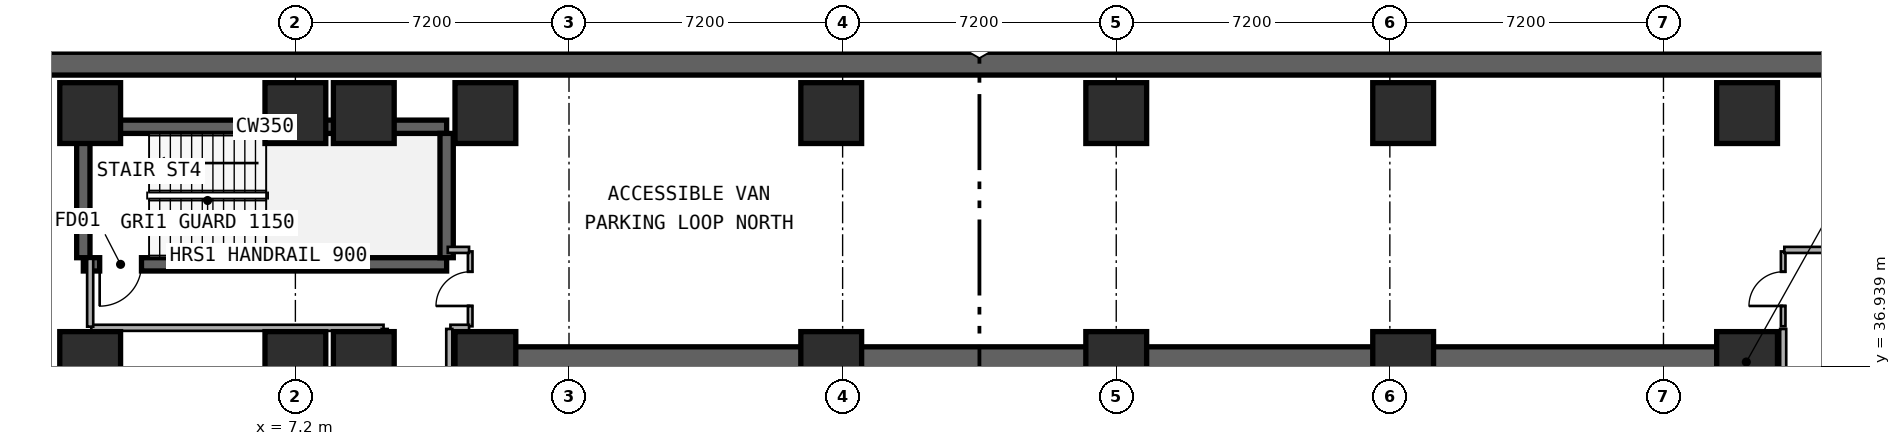
"""IFC4 building model, lengths in metres.
Left out: names, types, materials, properties, quantities, classifications, styles, units other than length and angle.
Written with IfcOpenShell. Run it as: python <this file> out.ifc"""

import sys

from ifc_helpers import new_model, si_unit, direction, frame, frame_2d, origin, origin_2d, place, context, subcontext, project, spatial, rectangle, extrude, element, fill, save


model = new_model("IFC4")
c1 = context("Model", 3, precision=1e-05, world=origin(), true_north=direction((0.0, 1.0)))
c2 = subcontext(c1, "Body", "Model", "MODEL_VIEW")
j1 = project(units=[si_unit("LENGTHUNIT", "METRE"), si_unit("PLANEANGLEUNIT", "RADIAN")], contexts=[c1])
p1 = place(None, origin())
s1 = spatial("IfcSite", under=j1, at=p1, CompositionType="ELEMENT")
p2 = place(p1, origin())
s2 = spatial("IfcBuilding", under=s1, at=p2, CompositionType="ELEMENT")
p3 = place(p2, frame((0.0, 0.0, -13.2)))
s3 = spatial("IfcBuildingStorey", under=s2, at=p3, CompositionType="ELEMENT", Elevation=-13.2)
p4 = place(p3, frame((0.3, 44.9, 0.0), z_axis=(0.0, 0.0, 1.0), x_axis=(1.0, 0.0, 0.0)))
e1 = element("IfcWall", 1, at=p4, inside=s3, PredefinedType="USERDEFINED", context=c2, shape_type="SweptSolid", body=[
    extrude(rectangle(XDim=57.0, YDim=0.6, at=frame_2d((28.5, 0.0))), origin(), (0.0, 0.0, 1.0), 4.4),
])
p5 = place(p3, frame((12.15, 37.05, 0.0), z_axis=(0.0, 0.0, 1.0), x_axis=(1.0, 0.0, 0.0)))
e2 = element("IfcWall", 2, at=p5, inside=s3, PredefinedType="SHEAR", context=c2, shape_type="SweptSolid", body=[
    extrude(rectangle(XDim=33.23, YDim=0.8, at=frame_2d((16.615, 0.0))), origin(), (0.0, 0.0, 1.0), 4.4),
])
p6 = place(p3, frame((1.62, 43.24, 0.0), z_axis=(0.0, 0.0, 1.0), x_axis=(1.0, 0.0, 0.0)))
e3 = element("IfcWall", 3, at=p6, inside=s3, PredefinedType="SHEAR", context=c2, shape_type="SweptSolid", body=[
    extrude(rectangle(XDim=9.56, YDim=0.35, at=frame_2d((4.78, 0.0))), origin(), (0.0, 0.0, 1.0), 4.4),
])
p7 = place(p3, frame((11.18, 39.62, 0.0), z_axis=(0.0, 0.0, 1.0), x_axis=(-1.0, 0.0, 0.0)))
e4 = element("IfcWall", 4, at=p7, inside=s3, PredefinedType="SHEAR", context=c2, shape_type="SweptSolid", body=[
    extrude(rectangle(XDim=9.56, YDim=0.35, at=frame_2d((4.78, 0.0))), origin(), (0.0, 0.0, 1.0), 4.4),
])
p8 = place(p7, frame((8.03, 0.0, 0.0)))
e5 = element("IfcOpeningElement", 5, at=p8, cuts=e4, PredefinedType="OPENING", context=c2, shape_type="SweptSolid", body=[
    extrude(rectangle(XDim=1.1, YDim=2.15, at=frame_2d((0.55, 1.075))), frame((0.0, 0.185, 0.0), z_axis=(0.0, -1.0, 0.0), x_axis=(1.0, 0.0, 0.0)), (0.0, 0.0, 1.0), 0.37),
])
for number, where, z_axis, x_axis in (
    (6, (1.62, 39.795, 0.0), (0.0, 0.0, 1.0), (0.0, 1.0, 0.0)),
    (7, (11.18, 39.795, 0.0), (0.0, 0.0, 1.0), (0.0, 1.0, 0.0)),
):
    element("IfcWall", number, at=place(p3, frame(where, z_axis=z_axis, x_axis=x_axis)), inside=s3, PredefinedType="SHEAR", context=c2, shape_type="SweptSolid", body=[
        extrude(rectangle(XDim=3.27, YDim=0.35, at=frame_2d((1.635, 0.0))), origin(), (0.0, 0.0, 1.0), 4.4),
    ])
for number, where, z_axis, x_axis in (
    (8, (12.2, 37.05, 0.0), (0.0, 0.0, 1.0), (1.0, 0.0, 0.0)),
    (9, (21.3, 37.05, 0.0), (0.0, 0.0, 1.0), (1.0, 0.0, 0.0)),
    (10, (28.8, 37.05, 0.0), (0.0, 0.0, 1.0), (1.0, 0.0, 0.0)),
    (11, (36.35, 37.05, 0.0), (0.0, 0.0, 1.0), (1.0, 0.0, 0.0)),
    (12, (45.4, 37.05, 0.0), (0.0, 0.0, 1.0), (1.0, 0.0, 0.0)),
    (13, (1.8, 37.05, 0.0), (0.0, 0.0, 1.0), (1.0, 0.0, 0.0)),
    (14, (1.8, 43.6, 0.0), (0.0, 0.0, 1.0), (1.0, 0.0, 0.0)),
    (15, (7.2, 37.05, 0.0), (0.0, 0.0, 1.0), (1.0, 0.0, 0.0)),
    (16, (7.2, 43.6, 0.0), (0.0, 0.0, 1.0), (1.0, 0.0, 0.0)),
    (17, (9.0, 37.05, 0.0), (0.0, 0.0, 1.0), (1.0, 0.0, 0.0)),
    (18, (9.0, 43.6, 0.0), (0.0, 0.0, 1.0), (1.0, 0.0, 0.0)),
    (19, (12.2, 43.6, 0.0), (0.0, 0.0, 1.0), (1.0, 0.0, 0.0)),
    (20, (21.3, 43.6, 0.0), (0.0, 0.0, 1.0), (1.0, 0.0, 0.0)),
    (21, (28.8, 43.6, 0.0), (0.0, 0.0, 1.0), (1.0, 0.0, 0.0)),
    (22, (36.35, 43.6, 0.0), (0.0, 0.0, 1.0), (1.0, 0.0, 0.0)),
    (23, (45.4, 43.6, 0.0), (0.0, 0.0, 1.0), (1.0, 0.0, 0.0)),
):
    element("IfcColumn", number, at=place(p3, frame(where, z_axis=z_axis, x_axis=x_axis)), inside=s3, PredefinedType="COLUMN", context=c2, shape_type="SweptSolid", body=[
        extrude(rectangle(XDim=1.6, YDim=1.6, at=origin_2d()), origin(), (0.0, 0.0, 1.0), 4.4),
    ])
p9 = place(p3, frame((46.35, 37.99, 0.0), z_axis=(0.0, 0.0, 1.0), x_axis=(0.0, 1.0, 0.0)))
e24 = element("IfcWall", 24, at=p9, inside=s3, PredefinedType="PARTITIONING", context=c2, shape_type="SweptSolid", body=[
    extrude(rectangle(XDim=1.97, YDim=0.12, at=frame_2d((0.985, 0.0))), origin(), (0.0, 0.0, 1.0), 4.08),
])
p10 = place(p9, frame((0.535, 0.0, 0.0)))
e25 = element("IfcOpeningElement", 25, at=p10, cuts=e24, PredefinedType="OPENING", context=c2, shape_type="SweptSolid", body=[
    extrude(rectangle(XDim=0.9, YDim=2.1, at=frame_2d((0.45, 1.05))), frame((0.0, 0.07, 0.0), z_axis=(0.0, -1.0, 0.0), x_axis=(1.0, 0.0, 0.0)), (0.0, 0.0, 1.0), 0.14),
])
p11 = place(p3, frame((11.8, 37.99, 0.0), z_axis=(0.0, 0.0, 1.0), x_axis=(0.0, 1.0, 0.0)))
e26 = element("IfcWall", 26, at=p11, inside=s3, PredefinedType="PARTITIONING", context=c2, shape_type="SweptSolid", body=[
    extrude(rectangle(XDim=1.97, YDim=0.12, at=frame_2d((0.985, 0.0))), origin(), (0.0, 0.0, 1.0), 3.41),
])
p12 = place(p11, frame((0.535, 0.0, 0.0)))
e27 = element("IfcOpeningElement", 27, at=p12, cuts=e26, PredefinedType="OPENING", context=c2, shape_type="SweptSolid", body=[
    extrude(rectangle(XDim=0.9, YDim=2.1, at=frame_2d((0.45, 1.05))), frame((0.0, 0.07, 0.0), z_axis=(0.0, -1.0, 0.0), x_axis=(1.0, 0.0, 0.0)), (0.0, 0.0, 1.0), 0.14),
])
p13 = place(p3, frame((46.38, 40.0, 0.0), z_axis=(0.0, 0.0, 1.0), x_axis=(1.0, 0.0, 0.0)))
e28 = element("IfcWall", 28, at=p13, inside=s3, PredefinedType="PARTITIONING", context=c2, shape_type="SweptSolid", body=[
    extrude(rectangle(XDim=1.64, YDim=0.16, at=frame_2d((0.82, 0.0))), origin(), (0.0, 0.0, 1.0), 4.08),
])
p14 = place(p3, frame((46.35, 27.63, 0.0), z_axis=(0.0, 0.0, 1.0), x_axis=(0.0, 1.0, 0.0)))
e29 = element("IfcWall", 29, at=p14, inside=s3, PredefinedType="PARTITIONING", context=c2, shape_type="SweptSolid", body=[
    extrude(rectangle(XDim=10.29, YDim=0.16, at=frame_2d((5.145, 0.0))), origin(), (0.0, 0.0, 1.0), 4.08),
])
p15 = place(p3, frame((1.83, 37.95, 0.0), z_axis=(0.0, 0.0, 1.0), x_axis=(1.0, 0.0, 0.0)))
e30 = element("IfcWall", 30, at=p15, inside=s3, PredefinedType="PARTITIONING", context=c2, shape_type="SweptSolid", body=[
    extrude(rectangle(XDim=7.69, YDim=0.16, at=frame_2d((3.845, 0.0))), origin(), (0.0, 0.0, 1.0), 4.08),
])
p16 = place(p3, frame((11.28, 37.95, 0.0), z_axis=(0.0, 0.0, 1.0), x_axis=(1.0, 0.0, 0.0)))
e31 = element("IfcWall", 31, at=p16, inside=s3, PredefinedType="PARTITIONING", context=c2, shape_type="SweptSolid", body=[
    extrude(rectangle(XDim=0.49, YDim=0.16, at=frame_2d((0.245, 0.0))), origin(), (0.0, 0.0, 1.0), 3.41),
])
p17 = place(p3, frame((11.21, 40.0, 0.0), z_axis=(0.0, 0.0, 1.0), x_axis=(1.0, 0.0, 0.0)))
e32 = element("IfcWall", 32, at=p17, inside=s3, PredefinedType="PARTITIONING", context=c2, shape_type="SweptSolid", body=[
    extrude(rectangle(XDim=0.56, YDim=0.16, at=frame_2d((0.28, 0.0))), origin(), (0.0, 0.0, 1.0), 3.41),
])
p18 = place(p3, frame((1.8, 37.98, 0.0), z_axis=(0.0, 0.0, 1.0), x_axis=(0.0, 1.0, 0.0)))
e33 = element("IfcWall", 33, at=p18, inside=s3, PredefinedType="PARTITIONING", context=c2, shape_type="SweptSolid", body=[
    extrude(rectangle(XDim=1.785, YDim=0.16, at=frame_2d((0.893, 0.0))), origin(), (0.0, 0.0, 1.0), 4.08),
])
for number, where, z_axis, x_axis in (
    (34, (9.55, 27.63, 0.0), (0.0, 0.0, 1.0), (0.0, 1.0, 0.0)),
    (35, (11.25, 27.63, 0.0), (0.0, 0.0, 1.0), (0.0, 1.0, 0.0)),
):
    element("IfcWall", number, at=place(p3, frame(where, z_axis=z_axis, x_axis=x_axis)), inside=s3, PredefinedType="PARTITIONING", context=c2, shape_type="SweptSolid", body=[
        extrude(rectangle(XDim=10.29, YDim=0.16, at=frame_2d((5.145, 0.0))), origin(), (0.0, 0.0, 1.0), 4.08),
    ])
p19 = place(p8, origin())
e36 = element("IfcDoor", 36, at=p19, inside=s3, OperationType="SINGLE_SWING_RIGHT", PredefinedType="DOOR", context=c2, shape_type="SweptSolid", body=[
    extrude(rectangle(XDim=1.1, YDim=2.15, at=frame_2d((0.55, 1.075))), frame((0.0, 0.025, 0.0), z_axis=(0.0, -1.0, 0.0), x_axis=(1.0, 0.0, 0.0)), (0.0, 0.0, 1.0), 0.05),
])
fill(e5, e36)
p20 = place(p10, origin())
e37 = element("IfcDoor", 37, at=p20, inside=s3, OperationType="SINGLE_SWING_LEFT", PredefinedType="DOOR", context=c2, shape_type="SweptSolid", body=[
    extrude(rectangle(XDim=0.9, YDim=2.1, at=frame_2d((0.45, 1.05))), frame((0.0, 0.025, 0.0), z_axis=(0.0, -1.0, 0.0), x_axis=(1.0, 0.0, 0.0)), (0.0, 0.0, 1.0), 0.05),
])
fill(e25, e37)
p21 = place(p12, origin())
e38 = element("IfcDoor", 38, at=p21, inside=s3, OperationType="SINGLE_SWING_LEFT", PredefinedType="DOOR", context=c2, shape_type="SweptSolid", body=[
    extrude(rectangle(XDim=0.9, YDim=2.1, at=frame_2d((0.45, 1.05))), frame((0.0, 0.025, 0.0), z_axis=(0.0, -1.0, 0.0), x_axis=(1.0, 0.0, 0.0)), (0.0, 0.0, 1.0), 0.05),
])
fill(e27, e38)
save(model, sys.argv[1])
